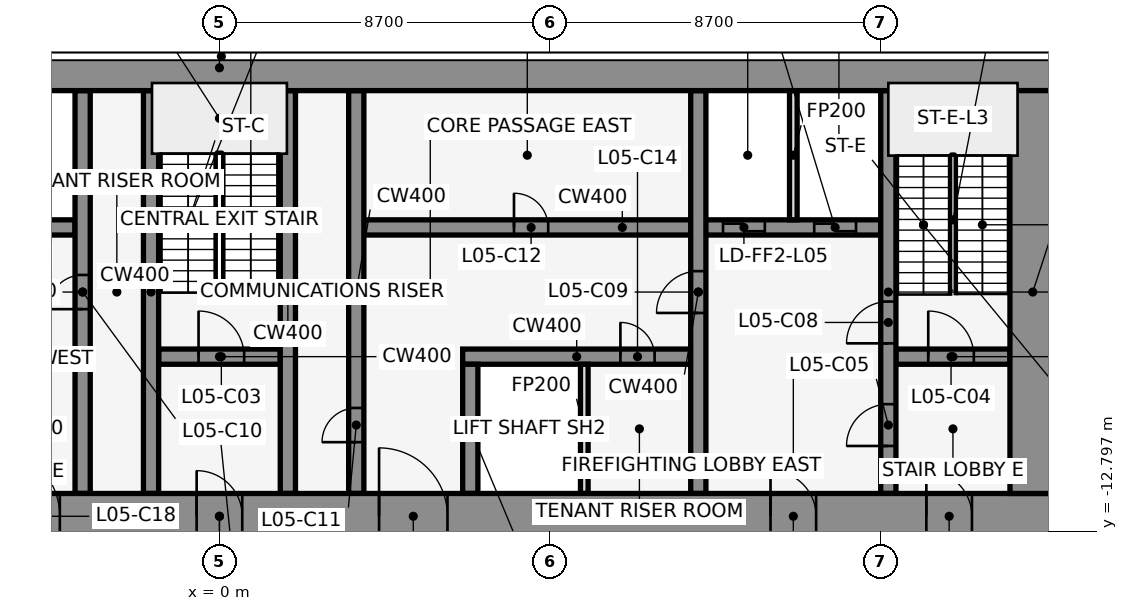
"""IFC4 building model, lengths in metres.
Left out: names, types, materials, properties, quantities, classifications, styles, units other than length and angle.
Written with IfcOpenShell. Run it as: python <this file> out.ifc"""

import sys

from ifc_helpers import new_model, si_unit, direction, frame, frame_2d, origin, place, context, subcontext, project, spatial, rectangle, extrude, element, fill, save


model = new_model("IFC4")
c1 = context("Model", 3, precision=1e-05, world=origin(), true_north=direction((0.0, 1.0)))
c2 = subcontext(c1, "Body", "Model", "MODEL_VIEW")
j1 = project(units=[si_unit("LENGTHUNIT", "METRE"), si_unit("PLANEANGLEUNIT", "RADIAN")], contexts=[c1])
p1 = place(None, origin())
s1 = spatial("IfcSite", under=j1, at=p1, CompositionType="ELEMENT")
p2 = place(p1, origin())
s2 = spatial("IfcBuilding", under=s1, at=p2, CompositionType="ELEMENT")
p3 = place(p2, frame((0.0, 0.0, 30.0)))
s3 = spatial("IfcBuildingStorey", under=s2, at=p3, CompositionType="ELEMENT", Elevation=30.0)
p4 = place(p3, frame((-1.6, -8.2, 0.0), z_axis=(0.0, 0.0, 1.0), x_axis=(1.0, 0.0, 0.0)))
e1 = element("IfcWall", 1, at=p4, inside=s3, PredefinedType="SHEAR", context=c2, shape_type="SweptSolid", body=[
    extrude(rectangle(XDim=3.2, YDim=0.4, at=frame_2d((1.6, 0.0))), origin(), (0.0, 0.0, 1.0), 5.0),
])
p5 = place(p4, frame((1.05, 0.0, 0.0)))
e2 = element("IfcOpeningElement", 2, at=p5, cuts=e1, PredefinedType="OPENING", context=c2, shape_type="SweptSolid", body=[
    extrude(rectangle(XDim=1.2, YDim=2.1, at=frame_2d((0.6, 1.05))), frame((0.0, 0.212, 0.0), z_axis=(0.0, -1.0, 0.0), x_axis=(1.0, 0.0, 0.0)), (0.0, 0.0, 1.0), 0.424),
])
p6 = place(p3, frame((6.4, -8.2, 0.0), z_axis=(0.0, 0.0, 1.0), x_axis=(1.0, 0.0, 0.0)))
e3 = element("IfcWall", 3, at=p6, inside=s3, PredefinedType="SHEAR", context=c2, shape_type="SweptSolid", body=[
    extrude(rectangle(XDim=6.0, YDim=0.4, at=frame_2d((3.0, 0.0))), origin(), (0.0, 0.0, 1.0), 5.0),
])
p7 = place(p6, frame((4.15, 0.0, 0.0)))
e4 = element("IfcOpeningElement", 4, at=p7, cuts=e3, PredefinedType="OPENING", context=c2, shape_type="SweptSolid", body=[
    extrude(rectangle(XDim=0.9, YDim=2.1, at=frame_2d((0.45, 1.05))), frame((0.0, 0.212, 0.0), z_axis=(0.0, -1.0, 0.0), x_axis=(1.0, 0.0, 0.0)), (0.0, 0.0, 1.0), 0.424),
])
p8 = place(p3, frame((17.8, -8.2, 0.0), z_axis=(0.0, 0.0, 1.0), x_axis=(1.0, 0.0, 0.0)))
e5 = element("IfcWall", 5, at=p8, inside=s3, PredefinedType="SHEAR", context=c2, shape_type="SweptSolid", body=[
    extrude(rectangle(XDim=3.0, YDim=0.4, at=frame_2d((1.5, 0.0))), origin(), (0.0, 0.0, 1.0), 5.0),
])
p9 = place(p8, frame((0.85, 0.0, 0.0)))
e6 = element("IfcOpeningElement", 6, at=p9, cuts=e5, PredefinedType="OPENING", context=c2, shape_type="SweptSolid", body=[
    extrude(rectangle(XDim=1.2, YDim=2.1, at=frame_2d((0.6, 1.05))), frame((0.0, 0.212, 0.0), z_axis=(0.0, -1.0, 0.0), x_axis=(1.0, 0.0, 0.0)), (0.0, 0.0, 1.0), 0.424),
])
p10 = place(p3, frame((-17.4, -4.8, 0.0), z_axis=(0.0, 0.0, 1.0), x_axis=(1.0, 0.0, 0.0)))
e7 = element("IfcWall", 7, at=p10, inside=s3, PredefinedType="SHEAR", context=c2, shape_type="SweptSolid", body=[
    extrude(rectangle(XDim=13.6, YDim=0.4, at=frame_2d((6.8, 0.0))), origin(), (0.0, 0.0, 1.0), 5.0),
])
p11 = place(p10, frame((0.65, 0.0, 0.0)))
e8 = element("IfcOpeningElement", 8, at=p11, cuts=e7, PredefinedType="OPENING", context=c2, shape_type="SweptSolid", body=[
    extrude(rectangle(XDim=1.1, YDim=2.1, at=frame_2d((0.55, 1.05))), frame((0.0, 0.212, 0.0), z_axis=(0.0, -1.0, 0.0), x_axis=(1.0, 0.0, 0.0)), (0.0, 0.0, 1.0), 0.424),
])
p12 = place(p10, frame((2.95, 0.0, 0.0)))
e9 = element("IfcOpeningElement", 9, at=p12, cuts=e7, PredefinedType="OPENING", context=c2, shape_type="SweptSolid", body=[
    extrude(rectangle(XDim=1.1, YDim=2.1, at=frame_2d((0.55, 1.05))), frame((0.0, 0.212, 0.0), z_axis=(0.0, -1.0, 0.0), x_axis=(1.0, 0.0, 0.0)), (0.0, 0.0, 1.0), 0.424),
])
p13 = place(p10, frame((5.65, 0.0, 0.0)))
e10 = element("IfcOpeningElement", 10, at=p13, cuts=e7, PredefinedType="OPENING", context=c2, shape_type="SweptSolid", body=[
    extrude(rectangle(XDim=1.2, YDim=2.1, at=frame_2d((0.6, 1.05))), frame((0.0, 0.212, 0.0), z_axis=(0.0, -1.0, 0.0), x_axis=(1.0, 0.0, 0.0)), (0.0, 0.0, 1.0), 0.424),
])
p14 = place(p10, frame((8.65, 0.0, 0.0)))
e11 = element("IfcOpeningElement", 11, at=p14, cuts=e7, PredefinedType="OPENING", context=c2, shape_type="SweptSolid", body=[
    extrude(rectangle(XDim=1.2, YDim=2.1, at=frame_2d((0.6, 1.05))), frame((0.0, 0.212, 0.0), z_axis=(0.0, -1.0, 0.0), x_axis=(1.0, 0.0, 0.0)), (0.0, 0.0, 1.0), 0.424),
])
p15 = place(p10, frame((11.65, 0.0, 0.0)))
e12 = element("IfcOpeningElement", 12, at=p15, cuts=e7, PredefinedType="OPENING", context=c2, shape_type="SweptSolid", body=[
    extrude(rectangle(XDim=1.2, YDim=2.1, at=frame_2d((0.6, 1.05))), frame((0.0, 0.212, 0.0), z_axis=(0.0, -1.0, 0.0), x_axis=(1.0, 0.0, 0.0)), (0.0, 0.0, 1.0), 0.424),
])
p16 = place(p3, frame((3.8, -4.8, 0.0), z_axis=(0.0, 0.0, 1.0), x_axis=(1.0, 0.0, 0.0)))
e13 = element("IfcWall", 13, at=p16, inside=s3, PredefinedType="SHEAR", context=c2, shape_type="SweptSolid", body=[
    extrude(rectangle(XDim=13.6, YDim=0.4, at=frame_2d((6.8, 0.0))), origin(), (0.0, 0.0, 1.0), 5.0),
])
p17 = place(p16, frame((9.45, 0.0, 0.0)))
e14 = element("IfcOpeningElement", 14, at=p17, cuts=e13, PredefinedType="OPENING", context=c2, shape_type="SweptSolid", body=[
    extrude(rectangle(XDim=1.1, YDim=2.1, at=frame_2d((0.55, 1.05))), frame((0.0, 0.212, 0.0), z_axis=(0.0, -1.0, 0.0), x_axis=(1.0, 0.0, 0.0)), (0.0, 0.0, 1.0), 0.424),
])
p18 = place(p16, frame((11.85, 0.0, 0.0)))
e15 = element("IfcOpeningElement", 15, at=p18, cuts=e13, PredefinedType="OPENING", context=c2, shape_type="SweptSolid", body=[
    extrude(rectangle(XDim=1.1, YDim=2.1, at=frame_2d((0.55, 1.05))), frame((0.0, 0.212, 0.0), z_axis=(0.0, -1.0, 0.0), x_axis=(1.0, 0.0, 0.0)), (0.0, 0.0, 1.0), 0.424),
])
p19 = place(p16, frame((3.95, 0.0, 0.0)))
e16 = element("IfcOpeningElement", 16, at=p19, cuts=e13, PredefinedType="OPENING", context=c2, shape_type="SweptSolid", body=[
    extrude(rectangle(XDim=0.9, YDim=2.1, at=frame_2d((0.45, 1.05))), frame((0.0, 0.212, 0.0), z_axis=(0.0, -1.0, 0.0), x_axis=(1.0, 0.0, 0.0)), (0.0, 0.0, 1.0), 0.424),
])
p20 = place(p3, frame((-3.6, -11.8, 0.0), z_axis=(0.0, 0.0, 1.0), x_axis=(0.0, 1.0, 0.0)))
e17 = element("IfcWall", 17, at=p20, inside=s3, PredefinedType="SHEAR", context=c2, shape_type="SweptSolid", body=[
    extrude(rectangle(XDim=10.6, YDim=0.4, at=frame_2d((5.3, 0.0))), origin(), (0.0, 0.0, 1.0), 5.0),
])
p21 = place(p20, frame((4.85, 0.0, 0.0)))
e18 = element("IfcOpeningElement", 18, at=p21, cuts=e17, PredefinedType="OPENING", context=c2, shape_type="SweptSolid", body=[
    extrude(rectangle(XDim=0.9, YDim=2.1, at=frame_2d((0.45, 1.05))), frame((0.0, 0.212, 0.0), z_axis=(0.0, -1.0, 0.0), x_axis=(1.0, 0.0, 0.0)), (0.0, 0.0, 1.0), 0.424),
])
for number, where, z_axis, x_axis in (
    (19, (-1.8, -11.8, 0.0), (0.0, 0.0, 1.0), (0.0, 1.0, 0.0)),
    (20, (1.8, -11.8, 0.0), (0.0, 0.0, 1.0), (0.0, 1.0, 0.0)),
):
    element("IfcWall", number, at=place(p3, frame(where, z_axis=z_axis, x_axis=x_axis)), inside=s3, PredefinedType="SHEAR", context=c2, shape_type="SweptSolid", body=[
        extrude(rectangle(XDim=10.6, YDim=0.4, at=frame_2d((5.3, 0.0))), origin(), (0.0, 0.0, 1.0), 5.0),
    ])
p22 = place(p3, frame((3.6, -11.8, 0.0), z_axis=(0.0, 0.0, 1.0), x_axis=(0.0, 1.0, 0.0)))
e21 = element("IfcWall", 21, at=p22, inside=s3, PredefinedType="SHEAR", context=c2, shape_type="SweptSolid", body=[
    extrude(rectangle(XDim=10.6, YDim=0.4, at=frame_2d((5.3, 0.0))), origin(), (0.0, 0.0, 1.0), 5.0),
])
p23 = place(p22, frame((1.35, 0.0, 0.0)))
e22 = element("IfcOpeningElement", 22, at=p23, cuts=e21, PredefinedType="OPENING", context=c2, shape_type="SweptSolid", body=[
    extrude(rectangle(XDim=0.9, YDim=2.1, at=frame_2d((0.45, 1.05))), frame((0.0, 0.212, 0.0), z_axis=(0.0, -1.0, 0.0), x_axis=(1.0, 0.0, 0.0)), (0.0, 0.0, 1.0), 0.424),
])
p24 = place(p3, frame((6.6, -11.8, 0.0), z_axis=(0.0, 0.0, 1.0), x_axis=(0.0, 1.0, 0.0)))
e23 = element("IfcWall", 23, at=p24, inside=s3, PredefinedType="SHEAR", context=c2, shape_type="SweptSolid", body=[
    extrude(rectangle(XDim=3.4, YDim=0.4, at=frame_2d((1.7, 0.0))), origin(), (0.0, 0.0, 1.0), 5.0),
])
p25 = place(p3, frame((9.6, -11.8, 0.0), z_axis=(0.0, 0.0, 1.0), x_axis=(0.0, 1.0, 0.0)))
e24 = element("IfcWall", 24, at=p25, inside=s3, PredefinedType="PARTITIONING", context=c2, shape_type="SweptSolid", body=[
    extrude(rectangle(XDim=3.4, YDim=0.2, at=frame_2d((1.7, 0.0))), origin(), (0.0, 0.0, 1.0), 3.74),
])
p26 = place(p3, frame((12.6, -11.8, 0.0), z_axis=(0.0, 0.0, 1.0), x_axis=(0.0, 1.0, 0.0)))
e25 = element("IfcWall", 25, at=p26, inside=s3, PredefinedType="SHEAR", context=c2, shape_type="SweptSolid", body=[
    extrude(rectangle(XDim=10.6, YDim=0.4, at=frame_2d((5.3, 0.0))), origin(), (0.0, 0.0, 1.0), 5.0),
])
p27 = place(p26, frame((4.75, 0.0, 0.0)))
e26 = element("IfcOpeningElement", 26, at=p27, cuts=e25, PredefinedType="OPENING", context=c2, shape_type="SweptSolid", body=[
    extrude(rectangle(XDim=1.1, YDim=2.1, at=frame_2d((0.55, 1.05))), frame((0.0, 0.212, 0.0), z_axis=(0.0, -1.0, 0.0), x_axis=(1.0, 0.0, 0.0)), (0.0, 0.0, 1.0), 0.424),
])
p28 = place(p3, frame((15.1, -4.6, 0.0), z_axis=(0.0, 0.0, 1.0), x_axis=(0.0, 1.0, 0.0)))
e27 = element("IfcWall", 27, at=p28, inside=s3, PredefinedType="PARTITIONING", context=c2, shape_type="SweptSolid", body=[
    extrude(rectangle(XDim=3.4, YDim=0.2, at=frame_2d((1.7, 0.0))), origin(), (0.0, 0.0, 1.0), 3.74),
])
p29 = place(p3, frame((17.6, -11.8, 0.0), z_axis=(0.0, 0.0, 1.0), x_axis=(0.0, 1.0, 0.0)))
e28 = element("IfcWall", 28, at=p29, inside=s3, PredefinedType="SHEAR", context=c2, shape_type="SweptSolid", body=[
    extrude(rectangle(XDim=10.6, YDim=0.4, at=frame_2d((5.3, 0.0))), origin(), (0.0, 0.0, 1.0), 5.0),
])
p30 = place(p29, frame((1.25, 0.0, 0.0)))
e29 = element("IfcOpeningElement", 29, at=p30, cuts=e28, PredefinedType="OPENING", context=c2, shape_type="SweptSolid", body=[
    extrude(rectangle(XDim=1.1, YDim=2.1, at=frame_2d((0.55, 1.05))), frame((0.0, 0.212, 0.0), z_axis=(0.0, -1.0, 0.0), x_axis=(1.0, 0.0, 0.0)), (0.0, 0.0, 1.0), 0.424),
])
p31 = place(p29, frame((3.95, 0.0, 0.0)))
e30 = element("IfcOpeningElement", 30, at=p31, cuts=e28, PredefinedType="OPENING", context=c2, shape_type="SweptSolid", body=[
    extrude(rectangle(XDim=1.1, YDim=2.1, at=frame_2d((0.55, 1.05))), frame((0.0, 0.212, 0.0), z_axis=(0.0, -1.0, 0.0), x_axis=(1.0, 0.0, 0.0)), (0.0, 0.0, 1.0), 0.424),
])
p32 = place(p3, frame((-22.0, -0.6, 0.0), z_axis=(0.0, 0.0, 1.0), x_axis=(1.0, 0.0, 0.0)))
e31 = element("IfcWall", 31, at=p32, inside=s3, PredefinedType="SHEAR", context=c2, shape_type="SweptSolid", body=[
    extrude(rectangle(XDim=44.0, YDim=1.2, at=frame_2d((22.0, 0.0))), origin(), (0.0, 0.0, 1.0), 5.0),
])
p33 = place(p3, frame((-22.0, -12.4, 0.0), z_axis=(0.0, 0.0, 1.0), x_axis=(1.0, 0.0, 0.0)))
e32 = element("IfcWall", 32, at=p33, inside=s3, PredefinedType="SHEAR", context=c2, shape_type="SweptSolid", body=[
    extrude(rectangle(XDim=44.0, YDim=1.2, at=frame_2d((22.0, 0.0))), origin(), (0.0, 0.0, 1.0), 5.0),
])
p34 = place(p33, frame((2.2, 0.0, 0.0)))
e33 = element("IfcOpeningElement", 33, at=p34, cuts=e32, PredefinedType="OPENING", context=c2, shape_type="SweptSolid", body=[
    extrude(rectangle(XDim=1.2, YDim=2.1, at=frame_2d((0.6, 1.05))), frame((0.0, 0.612, 0.0), z_axis=(0.0, -1.0, 0.0), x_axis=(1.0, 0.0, 0.0)), (0.0, 0.0, 1.0), 1.224),
])
p35 = place(p33, frame((21.4, 0.0, 0.0)))
e34 = element("IfcOpeningElement", 34, at=p35, cuts=e32, PredefinedType="OPENING", context=c2, shape_type="SweptSolid", body=[
    extrude(rectangle(XDim=1.2, YDim=2.1, at=frame_2d((0.6, 1.05))), frame((0.0, 0.612, 0.0), z_axis=(0.0, -1.0, 0.0), x_axis=(1.0, 0.0, 0.0)), (0.0, 0.0, 1.0), 1.224),
])
p36 = place(p33, frame((40.6, 0.0, 0.0)))
e35 = element("IfcOpeningElement", 35, at=p36, cuts=e32, PredefinedType="OPENING", context=c2, shape_type="SweptSolid", body=[
    extrude(rectangle(XDim=1.2, YDim=2.1, at=frame_2d((0.6, 1.05))), frame((0.0, 0.612, 0.0), z_axis=(0.0, -1.0, 0.0), x_axis=(1.0, 0.0, 0.0)), (0.0, 0.0, 1.0), 1.224),
])
p37 = place(p33, frame((16.0, 0.0, 0.0)))
e36 = element("IfcOpeningElement", 36, at=p37, cuts=e32, PredefinedType="OPENING", context=c2, shape_type="SweptSolid", body=[
    extrude(rectangle(XDim=1.8, YDim=2.1, at=frame_2d((0.9, 1.05))), frame((0.0, 0.612, 0.0), z_axis=(0.0, -1.0, 0.0), x_axis=(1.0, 0.0, 0.0)), (0.0, 0.0, 1.0), 1.224),
])
p38 = place(p33, frame((6.3, 0.0, 0.0)))
e37 = element("IfcOpeningElement", 37, at=p38, cuts=e32, PredefinedType="OPENING", context=c2, shape_type="SweptSolid", body=[
    extrude(rectangle(XDim=1.2, YDim=2.1, at=frame_2d((0.6, 1.05))), frame((0.0, 0.612, 0.0), z_axis=(0.0, -1.0, 0.0), x_axis=(1.0, 0.0, 0.0)), (0.0, 0.0, 1.0), 1.224),
])
p39 = place(p33, frame((26.2, 0.0, 0.0)))
e38 = element("IfcOpeningElement", 38, at=p39, cuts=e32, PredefinedType="OPENING", context=c2, shape_type="SweptSolid", body=[
    extrude(rectangle(XDim=1.8, YDim=2.1, at=frame_2d((0.9, 1.05))), frame((0.0, 0.612, 0.0), z_axis=(0.0, -1.0, 0.0), x_axis=(1.0, 0.0, 0.0)), (0.0, 0.0, 1.0), 1.224),
])
p40 = place(p33, frame((36.5, 0.0, 0.0)))
e39 = element("IfcOpeningElement", 39, at=p40, cuts=e32, PredefinedType="OPENING", context=c2, shape_type="SweptSolid", body=[
    extrude(rectangle(XDim=1.2, YDim=2.1, at=frame_2d((0.6, 1.05))), frame((0.0, 0.612, 0.0), z_axis=(0.0, -1.0, 0.0), x_axis=(1.0, 0.0, 0.0)), (0.0, 0.0, 1.0), 1.224),
])
p41 = place(p3, frame((21.4, -11.8, 0.0), z_axis=(0.0, 0.0, 1.0), x_axis=(0.0, 1.0, 0.0)))
e40 = element("IfcWall", 40, at=p41, inside=s3, PredefinedType="SHEAR", context=c2, shape_type="SweptSolid", body=[
    extrude(rectangle(XDim=10.6, YDim=1.2, at=frame_2d((5.3, 0.0))), origin(), (0.0, 0.0, 1.0), 5.0),
])
p42 = place(p5, origin())
e41 = element("IfcDoor", 41, at=p42, inside=s3, OperationType="SINGLE_SWING_LEFT", PredefinedType="DOOR", context=c2, shape_type="SweptSolid", body=[
    extrude(rectangle(XDim=1.2, YDim=2.1, at=frame_2d((0.6, 1.05))), frame((0.0, 0.025, 0.0), z_axis=(0.0, -1.0, 0.0), x_axis=(1.0, 0.0, 0.0)), (0.0, 0.0, 1.0), 0.05),
])
fill(e2, e41)
p43 = place(p9, origin())
e42 = element("IfcDoor", 42, at=p43, inside=s3, OperationType="SINGLE_SWING_RIGHT", PredefinedType="DOOR", context=c2, shape_type="SweptSolid", body=[
    extrude(rectangle(XDim=1.2, YDim=2.1, at=frame_2d((0.6, 1.05))), frame((0.0, 0.025, 0.0), z_axis=(0.0, -1.0, 0.0), x_axis=(1.0, 0.0, 0.0)), (0.0, 0.0, 1.0), 0.05),
])
fill(e6, e42)
p44 = place(p30, origin())
e43 = element("IfcDoor", 43, at=p44, inside=s3, OperationType="SINGLE_SWING_LEFT", PredefinedType="DOOR", context=c2, shape_type="SweptSolid", body=[
    extrude(rectangle(XDim=1.1, YDim=2.1, at=frame_2d((0.55, 1.05))), frame((0.0, 0.025, 0.0), z_axis=(0.0, -1.0, 0.0), x_axis=(1.0, 0.0, 0.0)), (0.0, 0.0, 1.0), 0.05),
])
fill(e29, e43)
p45 = place(p17, origin())
e44 = element("IfcDoor", 44, at=p45, inside=s3, OperationType="DOUBLE_DOOR_SLIDING", PredefinedType="DOOR", context=c2, shape_type="SweptSolid", body=[
    extrude(rectangle(XDim=1.1, YDim=2.1, at=frame_2d((0.55, 1.05))), frame((0.0, 0.025, 0.0), z_axis=(0.0, -1.0, 0.0), x_axis=(1.0, 0.0, 0.0)), (0.0, 0.0, 1.0), 0.05),
])
fill(e14, e44)
p46 = place(p18, origin())
e45 = element("IfcDoor", 45, at=p46, inside=s3, OperationType="DOUBLE_DOOR_SLIDING", PredefinedType="DOOR", context=c2, shape_type="SweptSolid", body=[
    extrude(rectangle(XDim=1.1, YDim=2.1, at=frame_2d((0.55, 1.05))), frame((0.0, 0.025, 0.0), z_axis=(0.0, -1.0, 0.0), x_axis=(1.0, 0.0, 0.0)), (0.0, 0.0, 1.0), 0.05),
])
fill(e15, e45)
p47 = place(p31, origin())
e46 = element("IfcDoor", 46, at=p47, inside=s3, OperationType="SINGLE_SWING_RIGHT", PredefinedType="DOOR", context=c2, shape_type="SweptSolid", body=[
    extrude(rectangle(XDim=1.1, YDim=2.1, at=frame_2d((0.55, 1.05))), frame((0.0, 0.025, 0.0), z_axis=(0.0, -1.0, 0.0), x_axis=(1.0, 0.0, 0.0)), (0.0, 0.0, 1.0), 0.05),
])
fill(e30, e46)
p48 = place(p27, frame((1.1, 0.0, 0.0), z_axis=(0.0, 0.0, 1.0), x_axis=(-1.0, 0.0, 0.0)))
e47 = element("IfcDoor", 47, at=p48, inside=s3, OperationType="SINGLE_SWING_RIGHT", PredefinedType="DOOR", context=c2, shape_type="SweptSolid", body=[
    extrude(rectangle(XDim=1.1, YDim=2.1, at=frame_2d((0.55, 1.05))), frame((0.0, 0.025, 0.0), z_axis=(0.0, -1.0, 0.0), x_axis=(1.0, 0.0, 0.0)), (0.0, 0.0, 1.0), 0.05),
])
fill(e26, e47)
p49 = place(p21, frame((0.9, 0.0, 0.0), z_axis=(0.0, 0.0, 1.0), x_axis=(-1.0, 0.0, 0.0)))
e48 = element("IfcDoor", 48, at=p49, inside=s3, OperationType="SINGLE_SWING_LEFT", PredefinedType="DOOR", context=c2, shape_type="SweptSolid", body=[
    extrude(rectangle(XDim=0.9, YDim=2.1, at=frame_2d((0.45, 1.05))), frame((0.0, 0.025, 0.0), z_axis=(0.0, -1.0, 0.0), x_axis=(1.0, 0.0, 0.0)), (0.0, 0.0, 1.0), 0.05),
])
fill(e18, e48)
p50 = place(p23, origin())
e49 = element("IfcDoor", 49, at=p50, inside=s3, OperationType="SINGLE_SWING_LEFT", PredefinedType="DOOR", context=c2, shape_type="SweptSolid", body=[
    extrude(rectangle(XDim=0.9, YDim=2.1, at=frame_2d((0.45, 1.05))), frame((0.0, 0.025, 0.0), z_axis=(0.0, -1.0, 0.0), x_axis=(1.0, 0.0, 0.0)), (0.0, 0.0, 1.0), 0.05),
])
fill(e22, e49)
p51 = place(p19, origin())
e50 = element("IfcDoor", 50, at=p51, inside=s3, OperationType="SINGLE_SWING_RIGHT", PredefinedType="DOOR", context=c2, shape_type="SweptSolid", body=[
    extrude(rectangle(XDim=0.9, YDim=2.1, at=frame_2d((0.45, 1.05))), frame((0.0, 0.025, 0.0), z_axis=(0.0, -1.0, 0.0), x_axis=(1.0, 0.0, 0.0)), (0.0, 0.0, 1.0), 0.05),
])
fill(e16, e50)
p52 = place(p7, frame((0.9, 0.0, 0.0), z_axis=(0.0, 0.0, 1.0), x_axis=(-1.0, 0.0, 0.0)))
e51 = element("IfcDoor", 51, at=p52, inside=s3, OperationType="SINGLE_SWING_LEFT", PredefinedType="DOOR", context=c2, shape_type="SweptSolid", body=[
    extrude(rectangle(XDim=0.9, YDim=2.1, at=frame_2d((0.45, 1.05))), frame((0.0, 0.025, 0.0), z_axis=(0.0, -1.0, 0.0), x_axis=(1.0, 0.0, 0.0)), (0.0, 0.0, 1.0), 0.05),
])
fill(e4, e51)
p53 = place(p35, frame((1.2, 0.0, 0.0), z_axis=(0.0, 0.0, 1.0), x_axis=(-1.0, 0.0, 0.0)))
e52 = element("IfcDoor", 52, at=p53, inside=s3, OperationType="SINGLE_SWING_RIGHT", PredefinedType="DOOR", context=c2, shape_type="SweptSolid", body=[
    extrude(rectangle(XDim=1.2, YDim=2.1, at=frame_2d((0.6, 1.05))), frame((0.0, 0.025, 0.0), z_axis=(0.0, -1.0, 0.0), x_axis=(1.0, 0.0, 0.0)), (0.0, 0.0, 1.0), 0.05),
])
fill(e34, e52)
p54 = place(p36, frame((1.2, 0.0, 0.0), z_axis=(0.0, 0.0, 1.0), x_axis=(-1.0, 0.0, 0.0)))
e53 = element("IfcDoor", 53, at=p54, inside=s3, OperationType="SINGLE_SWING_RIGHT", PredefinedType="DOOR", context=c2, shape_type="SweptSolid", body=[
    extrude(rectangle(XDim=1.2, YDim=2.1, at=frame_2d((0.6, 1.05))), frame((0.0, 0.025, 0.0), z_axis=(0.0, -1.0, 0.0), x_axis=(1.0, 0.0, 0.0)), (0.0, 0.0, 1.0), 0.05),
])
fill(e35, e53)
p55 = place(p37, origin())
e54 = element("IfcDoor", 54, at=p55, inside=s3, OperationType="SINGLE_SWING_LEFT", PredefinedType="DOOR", context=c2, shape_type="SweptSolid", body=[
    extrude(rectangle(XDim=1.8, YDim=2.1, at=frame_2d((0.9, 1.05))), frame((0.0, 0.025, 0.0), z_axis=(0.0, -1.0, 0.0), x_axis=(1.0, 0.0, 0.0)), (0.0, 0.0, 1.0), 0.05),
])
fill(e36, e54)
p56 = place(p39, origin())
e55 = element("IfcDoor", 55, at=p56, inside=s3, OperationType="SINGLE_SWING_LEFT", PredefinedType="DOOR", context=c2, shape_type="SweptSolid", body=[
    extrude(rectangle(XDim=1.8, YDim=2.1, at=frame_2d((0.9, 1.05))), frame((0.0, 0.025, 0.0), z_axis=(0.0, -1.0, 0.0), x_axis=(1.0, 0.0, 0.0)), (0.0, 0.0, 1.0), 0.05),
])
fill(e38, e55)
p57 = place(p40, frame((1.2, 0.0, 0.0), z_axis=(0.0, 0.0, 1.0), x_axis=(-1.0, 0.0, 0.0)))
e56 = element("IfcDoor", 56, at=p57, inside=s3, OperationType="SINGLE_SWING_RIGHT", PredefinedType="DOOR", context=c2, shape_type="SweptSolid", body=[
    extrude(rectangle(XDim=1.2, YDim=2.1, at=frame_2d((0.6, 1.05))), frame((0.0, 0.025, 0.0), z_axis=(0.0, -1.0, 0.0), x_axis=(1.0, 0.0, 0.0)), (0.0, 0.0, 1.0), 0.05),
])
fill(e39, e56)
save(model, sys.argv[1])
